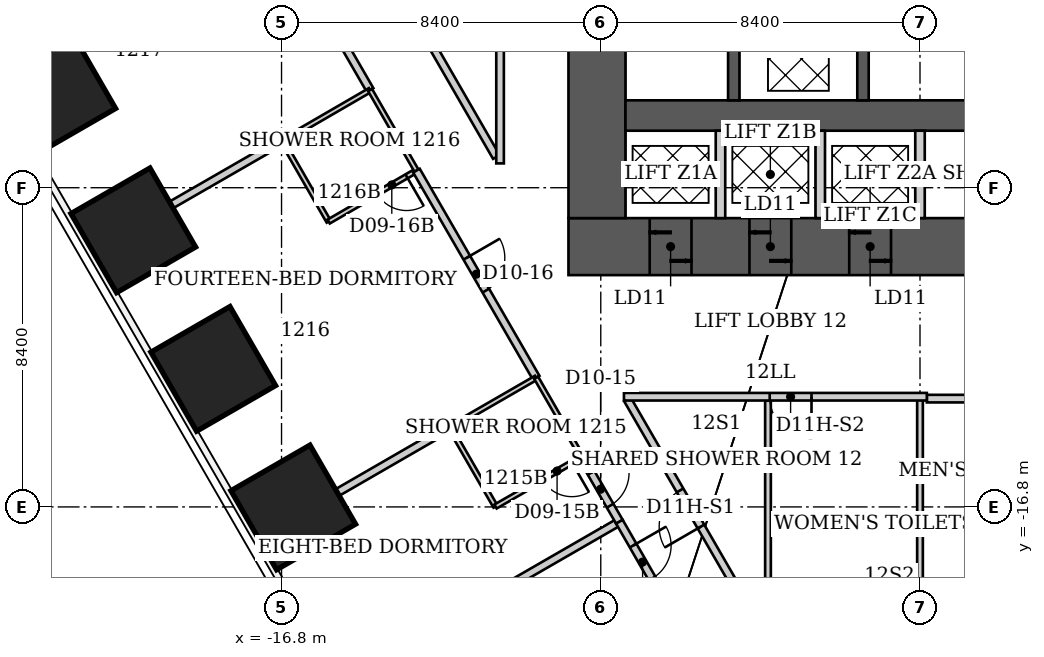
"""IFC4 building model, lengths in metres.
Left out: names, types, materials, properties, quantities, classifications, styles, units other than length and angle.
Written with IfcOpenShell. Run it as: python <this file> out.ifc"""

import sys

from ifc_helpers import new_model, si_unit, direction, frame, frame_2d, origin, origin_2d, place, context, subcontext, project, spatial, rectangle, extrude, clip, halfspace, element, fill, save


model = new_model("IFC4")
c1 = context("Model", 3, precision=1e-05, world=origin(), true_north=direction((0.0, 1.0)))
c2 = subcontext(c1, "Body", "Model", "MODEL_VIEW")
j1 = project(units=[si_unit("LENGTHUNIT", "METRE"), si_unit("PLANEANGLEUNIT", "RADIAN")], contexts=[c1])
p1 = place(None, origin())
s1 = spatial("IfcSite", under=j1, at=p1, CompositionType="ELEMENT")
p2 = place(p1, origin())
s2 = spatial("IfcBuilding", under=s1, at=p2, CompositionType="ELEMENT")
p3 = place(p2, frame((0.0, 0.0, 53.4)))
s3 = spatial("IfcBuildingStorey", under=s2, at=p3, CompositionType="ELEMENT", Elevation=53.4)
p4 = place(p3, frame((-16.491, -16.813, 0.0), z_axis=(0.0, 0.0, 1.0), x_axis=(-0.866025403784, -0.5, 0.0)))
e1 = element("IfcColumn", 1, at=p4, inside=s3, PredefinedType="COLUMN", context=c2, shape_type="SweptSolid", body=[
    clip(extrude(rectangle(XDim=2.4, YDim=2.4, at=origin_2d()), origin(), (0.0, 0.0, 1.0), 3.744), halfspace(frame((0.0, 0.0, 3.64)), False)),
])
for number, where, z_axis, x_axis in (
    (2, (-18.596, -13.167, 0.0), (0.0, 0.0, 1.0), (-0.866, -0.5, 0.0)),
    (3, (-20.701, -9.521, 0.0), (0.0, 0.0, 1.0), (-0.866, -0.5, 0.0)),
):
    element("IfcColumn", number, at=place(p3, frame(where, z_axis=z_axis, x_axis=x_axis)), inside=s3, PredefinedType="COLUMN", context=c2, shape_type="SweptSolid", body=[
        clip(extrude(rectangle(XDim=2.4, YDim=2.4, at=origin_2d()), origin(), (0.0, 0.0, 1.0), 3.752), halfspace(frame((0.0, 0.0, 3.64)), False)),
    ])
p5 = place(p3, frame((-22.806, -5.875, 0.0), z_axis=(0.0, 0.0, 1.0), x_axis=(-0.866025403784, -0.5, 0.0)))
e4 = element("IfcColumn", 4, at=p5, inside=s3, PredefinedType="COLUMN", context=c2, shape_type="SweptSolid", body=[
    clip(extrude(rectangle(XDim=2.4, YDim=2.4, at=origin_2d()), origin(), (0.0, 0.0, 1.0), 3.744), halfspace(frame((0.0, 0.0, 3.64)), False)),
])
p6 = place(p3, frame((-9.25, -9.95, 0.0), z_axis=(0.0, 0.0, 1.0), x_axis=(1.0, 0.0, 0.0)))
e5 = element("IfcWall", 5, at=p6, inside=s3, PredefinedType="SHEAR", context=c2, shape_type="SweptSolid", body=[
    extrude(rectangle(XDim=18.5, YDim=1.5, at=frame_2d((9.25, 0.0))), origin(), (0.0, 0.0, 1.0), 3.8),
])
p7 = place(p6, frame((2.137, 0.0, 0.0)))
e6 = element("IfcOpeningElement", 6, at=p7, cuts=e5, PredefinedType="OPENING", context=c2, shape_type="SweptSolid", body=[
    extrude(rectangle(XDim=1.1, YDim=2.1, at=frame_2d((0.55, 1.05))), frame((0.0, 0.75, 0.0), z_axis=(0.0, -1.0, 0.0), x_axis=(1.0, 0.0, 0.0)), (0.0, 0.0, 1.0), 1.5),
])
p8 = place(p6, frame((4.762, 0.0, 0.0)))
e7 = element("IfcOpeningElement", 7, at=p8, cuts=e5, PredefinedType="OPENING", context=c2, shape_type="SweptSolid", body=[
    extrude(rectangle(XDim=1.1, YDim=2.1, at=frame_2d((0.55, 1.05))), frame((0.0, 0.75, 0.0), z_axis=(0.0, -1.0, 0.0), x_axis=(1.0, 0.0, 0.0)), (0.0, 0.0, 1.0), 1.5),
])
p9 = place(p6, frame((7.387, 0.0, 0.0)))
e8 = element("IfcOpeningElement", 8, at=p9, cuts=e5, PredefinedType="OPENING", context=c2, shape_type="SweptSolid", body=[
    extrude(rectangle(XDim=1.1, YDim=2.1, at=frame_2d((0.55, 1.05))), frame((0.0, 0.75, 0.0), z_axis=(0.0, -1.0, 0.0), x_axis=(1.0, 0.0, 0.0)), (0.0, 0.0, 1.0), 1.5),
])
p10 = place(p3, frame((-8.5, -9.2, 0.0), z_axis=(0.0, 0.0, 1.0), x_axis=(0.0, 1.0, 0.0)))
e9 = element("IfcWall", 9, at=p10, inside=s3, PredefinedType="SHEAR", context=c2, shape_type="SweptSolid", body=[
    extrude(rectangle(XDim=15.3, YDim=1.5, at=frame_2d((7.65, 0.0))), origin(), (0.0, 0.0, 1.0), 3.8),
])
p11 = place(p10, frame((10.7, 0.0, 0.0)))
e10 = element("IfcOpeningElement", 10, at=p11, cuts=e9, PredefinedType="OPENING", context=c2, shape_type="SweptSolid", body=[
    extrude(rectangle(XDim=1.2, YDim=2.2, at=frame_2d((0.6, 1.1))), frame((0.0, 0.75, 0.0), z_axis=(0.0, -1.0, 0.0), x_axis=(1.0, 0.0, 0.0)), (0.0, 0.0, 1.0), 1.5),
])
p12 = place(p3, frame((-7.75, -6.5, 0.0), z_axis=(0.0, 0.0, 1.0), x_axis=(1.0, 0.0, 0.0)))
e11 = element("IfcWall", 11, at=p12, inside=s3, PredefinedType="SHEAR", context=c2, shape_type="SweptSolid", body=[
    extrude(rectangle(XDim=15.5, YDim=0.8, at=frame_2d((7.75, 0.0))), origin(), (0.0, 0.0, 1.0), 3.8),
])
for number, where, z_axis, x_axis in (
    (12, (-4.9, -6.1, 0.0), (0.0, 0.0, 1.0), (0.0, 1.0, 0.0)),
    (13, (-1.5, -6.1, 0.0), (0.0, 0.0, 1.0), (0.0, 1.0, 0.0)),
):
    element("IfcWall", number, at=place(p3, frame(where, z_axis=z_axis, x_axis=x_axis)), inside=s3, PredefinedType="SHEAR", context=c2, shape_type="SweptSolid", body=[
        extrude(rectangle(XDim=7.2, YDim=0.3, at=frame_2d((3.6, 0.0))), origin(), (0.0, 0.0, 1.0), 3.8),
    ])
for number, where, z_axis, x_axis in (
    (14, (-5.25, -9.2, 0.0), (0.0, 0.0, 1.0), (0.0, 1.0, 0.0)),
    (15, (-2.625, -9.2, 0.0), (0.0, 0.0, 1.0), (0.0, 1.0, 0.0)),
    (16, (0.0, -9.2, 0.0), (0.0, 0.0, 1.0), (0.0, 1.0, 0.0)),
):
    element("IfcWall", number, at=place(p3, frame(where, z_axis=z_axis, x_axis=x_axis)), inside=s3, PredefinedType="PARTITIONING", context=c2, shape_type="SweptSolid", body=[
        extrude(rectangle(XDim=2.3, YDim=0.25, at=frame_2d((1.15, 0.0))), origin(), (0.0, 0.0, 1.0), 3.8),
    ])
p13 = place(p3, frame((-21.726, -10.02, 0.0), z_axis=(0.0, 0.0, 1.0), x_axis=(0.866442508333, 0.499276856818, 0.0)))
e17 = element("IfcWall", 17, at=p13, inside=s3, PredefinedType="PARTITIONING", context=c2, shape_type="SweptSolid", body=[
    extrude(rectangle(XDim=5.708, YDim=0.2, at=frame_2d((2.854, 0.0))), origin(), (0.0, 0.0, 1.0), 3.023),
])
p14 = place(p3, frame((-17.621, -0.38, 0.0), z_axis=(0.0, 0.0, 1.0), x_axis=(0.500505674396, -0.865733255627, 0.0)))
e18 = element("IfcWall", 18, at=p14, inside=s3, PredefinedType="PARTITIONING", context=c2, shape_type="SweptSolid", body=[
    extrude(rectangle(XDim=6.295, YDim=0.2, at=frame_2d((3.147, 0.0))), origin(), (0.0, 0.0, 1.0), 3.64),
])
p15 = place(p14, frame((2.647, 0.0, 0.0)))
e19 = element("IfcOpeningElement", 19, at=p15, cuts=e18, PredefinedType="OPENING", context=c2, shape_type="SweptSolid", body=[
    extrude(rectangle(XDim=1.0, YDim=2.13, at=frame_2d((0.5, 1.065))), frame((0.0, 0.1, 0.0), z_axis=(0.0, -1.0, 0.0), x_axis=(1.0, 0.0, 0.0)), (0.0, 0.0, 1.0), 0.2),
])
p16 = place(p3, frame((-17.356, -17.59, 0.0), z_axis=(0.0, 0.0, 1.0), x_axis=(0.865929957466, 0.500165281445, 0.0)))
e20 = element("IfcWall", 20, at=p16, inside=s3, PredefinedType="PARTITIONING", context=c2, shape_type="SweptSolid", body=[
    extrude(rectangle(XDim=5.758, YDim=0.2, at=frame_2d((2.879, 0.0))), origin(), (0.0, 0.0, 1.0), 3.64),
])
p17 = place(p3, frame((-16.78, -7.17, 0.0), z_axis=(0.0, 0.0, 1.0), x_axis=(0.498748634132, -0.866746675766, 0.0)))
e21 = element("IfcWall", 21, at=p17, inside=s3, PredefinedType="PARTITIONING", context=c2, shape_type="SweptSolid", body=[
    extrude(rectangle(XDim=2.446, YDim=0.12, at=frame_2d((1.223, 0.0))), origin(), (0.0, 0.0, 1.0), 3.64),
])
p18 = place(p3, frame((-16.78, -7.17, 0.0), z_axis=(0.0, 0.0, 1.0), x_axis=(0.865029602175, 0.501720826119, 0.0)))
e22 = element("IfcWall", 22, at=p18, inside=s3, PredefinedType="PARTITIONING", context=c2, shape_type="SweptSolid", body=[
    extrude(rectangle(XDim=2.67, YDim=0.12, at=frame_2d((1.335, 0.0))), origin(), (0.0, 0.0, 1.0), 3.023),
])
p19 = place(p3, frame((-15.56, -9.29, 0.0), z_axis=(0.0, 0.0, 1.0), x_axis=(0.86498992408, 0.501789229896, 0.0)))
e23 = element("IfcWall", 23, at=p19, inside=s3, PredefinedType="PARTITIONING", context=c2, shape_type="SweptSolid", body=[
    extrude(rectangle(XDim=2.671, YDim=0.12, at=frame_2d((1.335, 0.0))), origin(), (0.0, 0.0, 1.0), 3.64),
])
p20 = place(p19, frame((1.47, 0.0, 0.0)))
e24 = element("IfcOpeningElement", 24, at=p20, cuts=e23, PredefinedType="OPENING", context=c2, shape_type="SweptSolid", body=[
    extrude(rectangle(XDim=0.9, YDim=2.03, at=frame_2d((0.45, 1.015))), frame((0.0, 0.06, 0.0), z_axis=(0.0, -1.0, 0.0), x_axis=(1.0, 0.0, 0.0)), (0.0, 0.0, 1.0), 0.12),
])
p21 = place(p3, frame((-15.176, -21.38, 0.0), z_axis=(0.0, 0.0, 1.0), x_axis=(0.866276837306, 0.49956425127, 0.0)))
e25 = element("IfcWall", 25, at=p21, inside=s3, PredefinedType="PARTITIONING", context=c2, shape_type="SweptSolid", body=[
    extrude(rectangle(XDim=8.373, YDim=0.2, at=frame_2d((4.186, 0.0))), origin(), (0.0, 0.0, 1.0), 3.64),
])
p22 = place(p3, frame((-14.47, -5.83, 0.0), z_axis=(0.0, 0.0, 1.0), x_axis=(0.498673646582, -0.86678982124, 0.0)))
e26 = element("IfcWall", 26, at=p22, inside=s3, PredefinedType="PARTITIONING", context=c2, shape_type="SweptSolid", body=[
    extrude(rectangle(XDim=2.446, YDim=0.12, at=frame_2d((1.223, 0.0))), origin(), (0.0, 0.0, 1.0), 3.64),
])
p23 = place(p3, frame((-13.25, -7.95, 0.0), z_axis=(0.0, 0.0, 1.0), x_axis=(0.500447534468, -0.865766865412, 0.0)))
e27 = element("IfcWall", 27, at=p23, inside=s3, PredefinedType="PARTITIONING", context=c2, shape_type="SweptSolid", body=[
    extrude(rectangle(XDim=6.295, YDim=0.2, at=frame_2d((3.147, 0.0))), origin(), (0.0, 0.0, 1.0), 3.64),
])
p24 = place(p23, frame((2.647, 0.0, 0.0)))
e28 = element("IfcOpeningElement", 28, at=p24, cuts=e27, PredefinedType="OPENING", context=c2, shape_type="SweptSolid", body=[
    extrude(rectangle(XDim=1.0, YDim=2.13, at=frame_2d((0.5, 1.065))), frame((0.0, 0.1, 0.0), z_axis=(0.0, -1.0, 0.0), x_axis=(1.0, 0.0, 0.0)), (0.0, 0.0, 1.0), 0.2),
])
p25 = place(p3, frame((-12.37, -14.71, 0.0), z_axis=(0.0, 0.0, 1.0), x_axis=(0.499769390944, -0.866158505053, 0.0)))
e29 = element("IfcWall", 29, at=p25, inside=s3, PredefinedType="PARTITIONING", context=c2, shape_type="SweptSolid", body=[
    extrude(rectangle(XDim=2.402, YDim=0.12, at=frame_2d((1.201, 0.0))), origin(), (0.0, 0.0, 1.0), 3.64),
])
p26 = place(p3, frame((-12.37, -14.71, 0.0), z_axis=(0.0, 0.0, 1.0), x_axis=(0.866114241029, 0.499846097802, 0.0)))
e30 = element("IfcWall", 30, at=p26, inside=s3, PredefinedType="PARTITIONING", context=c2, shape_type="SweptSolid", body=[
    extrude(rectangle(XDim=2.621, YDim=0.12, at=frame_2d((1.311, 0.0))), origin(), (0.0, 0.0, 1.0), 3.64),
])
p27 = place(p3, frame((-11.17, -16.79, 0.0), z_axis=(0.0, 0.0, 1.0), x_axis=(0.866114241029, 0.499846097802, 0.0)))
e31 = element("IfcWall", 31, at=p27, inside=s3, PredefinedType="PARTITIONING", context=c2, shape_type="SweptSolid", body=[
    extrude(rectangle(XDim=2.621, YDim=0.12, at=frame_2d((1.311, 0.0))), origin(), (0.0, 0.0, 1.0), 3.64),
])
p28 = place(p27, frame((1.421, 0.0, 0.0)))
e32 = element("IfcOpeningElement", 32, at=p28, cuts=e31, PredefinedType="OPENING", context=c2, shape_type="SweptSolid", body=[
    extrude(rectangle(XDim=0.9, YDim=2.03, at=frame_2d((0.45, 1.015))), frame((0.0, 0.06, 0.0), z_axis=(0.0, -1.0, 0.0), x_axis=(1.0, 0.0, 0.0)), (0.0, 0.0, 1.0), 0.12),
])
p29 = place(p3, frame((-11.147, -7.591, 0.0), z_axis=(0.0, 0.0, 1.0), x_axis=(-0.499915842114, 0.866073986911, 0.0)))
e33 = element("IfcWall", 33, at=p29, inside=s3, PredefinedType="PARTITIONING", context=c2, shape_type="SweptSolid", body=[
    extrude(rectangle(XDim=14.607, YDim=0.2, at=frame_2d((7.304, 0.0))), origin(), (0.0, 0.0, 1.0), 3.64),
])
p30 = place(p3, frame((-11.05, 9.4, 0.0), z_axis=(0.0, 0.0, 1.0), x_axis=(0.0, -1.0, 0.0)))
e34 = element("IfcWall", 34, at=p30, inside=s3, PredefinedType="PARTITIONING", context=c2, shape_type="SweptSolid", body=[
    extrude(rectangle(XDim=17.16, YDim=0.2, at=frame_2d((8.58, 0.0))), origin(), (0.0, 0.0, 1.0), 3.64),
])
p31 = place(p30, frame((8.03, 0.0, 0.0)))
e35 = element("IfcOpeningElement", 35, at=p31, cuts=e34, PredefinedType="OPENING", context=c2, shape_type="SweptSolid", body=[
    extrude(rectangle(XDim=1.1, YDim=2.2, at=frame_2d((0.55, 1.1))), frame((0.0, 0.1, 0.0), z_axis=(0.0, -1.0, 0.0), x_axis=(1.0, 0.0, 0.0)), (0.0, 0.0, 1.0), 0.2),
])
p32 = place(p3, frame((-10.1, -13.4, 0.0), z_axis=(0.0, 0.0, 1.0), x_axis=(0.499769390944, -0.866158505053, 0.0)))
e36 = element("IfcWall", 36, at=p32, inside=s3, PredefinedType="PARTITIONING", context=c2, shape_type="SweptSolid", body=[
    extrude(rectangle(XDim=2.402, YDim=0.12, at=frame_2d((1.201, 0.0))), origin(), (0.0, 0.0, 1.0), 3.64),
])
p33 = place(p3, frame((-8.9, -15.48, 0.0), z_axis=(0.0, 0.0, 1.0), x_axis=(0.501041141208, -0.865423465603, 0.0)))
e37 = element("IfcWall", 37, at=p33, inside=s3, PredefinedType="PARTITIONING", context=c2, shape_type="SweptSolid", body=[
    extrude(rectangle(XDim=1.976, YDim=0.2, at=frame_2d((0.988, 0.0))), origin(), (0.0, 0.0, 1.0), 3.64),
])
p34 = place(p33, frame((0.488, 0.0, 0.0)))
e38 = element("IfcOpeningElement", 38, at=p34, cuts=e37, PredefinedType="OPENING", context=c2, shape_type="SweptSolid", body=[
    extrude(rectangle(XDim=1.0, YDim=2.13, at=frame_2d((0.5, 1.065))), frame((0.0, 0.1, 0.0), z_axis=(0.0, -1.0, 0.0), x_axis=(1.0, 0.0, 0.0)), (0.0, 0.0, 1.0), 0.2),
])
p35 = place(p3, frame((-7.91, -17.19, 0.0), z_axis=(0.0, 0.0, 1.0), x_axis=(0.498748634132, -0.866746675766, 0.0)))
e39 = element("IfcWall", 39, at=p35, inside=s3, PredefinedType="PARTITIONING", context=c2, shape_type="SweptSolid", body=[
    extrude(rectangle(XDim=2.446, YDim=0.2, at=frame_2d((1.223, 0.0))), origin(), (0.0, 0.0, 1.0), 3.64),
])
p36 = place(p35, frame((0.723, 0.0, 0.0)))
e40 = element("IfcOpeningElement", 40, at=p36, cuts=e39, PredefinedType="OPENING", context=c2, shape_type="SweptSolid", body=[
    extrude(rectangle(XDim=1.0, YDim=2.13, at=frame_2d((0.5, 1.065))), frame((0.0, 0.1, 0.0), z_axis=(0.0, -1.0, 0.0), x_axis=(1.0, 0.0, 0.0)), (0.0, 0.0, 1.0), 0.2),
])
p37 = place(p3, frame((-4.38, -19.71, 0.0), z_axis=(0.0, 0.0, 1.0), x_axis=(-0.500523653757, 0.865722860984, 0.0)))
e41 = element("IfcWall", 41, at=p37, inside=s3, PredefinedType="PARTITIONING", context=c2, shape_type="SweptSolid", body=[
    extrude(rectangle(XDim=6.628, YDim=0.2, at=frame_2d((3.314, 0.0))), origin(), (0.0, 0.0, 1.0), 3.64),
])
p38 = place(p37, frame((2.764, 0.0, 0.0)))
e42 = element("IfcOpeningElement", 42, at=p38, cuts=e41, PredefinedType="OPENING", context=c2, shape_type="SweptSolid", body=[
    extrude(rectangle(XDim=1.1, YDim=2.2, at=frame_2d((0.55, 1.1))), frame((0.0, 0.1, 0.0), z_axis=(0.0, -1.0, 0.0), x_axis=(1.0, 0.0, 0.0)), (0.0, 0.0, 1.0), 0.2),
])
p39 = place(p3, frame((-4.0, -14.0, 0.0), z_axis=(0.0, 0.0, 1.0), x_axis=(0.0, -1.0, 0.0)))
e43 = element("IfcWall", 43, at=p39, inside=s3, PredefinedType="PARTITIONING", context=c2, shape_type="SweptSolid", body=[
    extrude(rectangle(XDim=5.71, YDim=0.15, at=frame_2d((2.855, 0.0))), origin(), (0.0, 0.0, 1.0), 3.64),
])
p40 = place(p3, frame((0.0, -13.95, 0.0), z_axis=(0.0, 0.0, 1.0), x_axis=(0.0, -1.0, 0.0)))
e44 = element("IfcWall", 44, at=p40, inside=s3, PredefinedType="PARTITIONING", context=c2, shape_type="SweptSolid", body=[
    extrude(rectangle(XDim=5.76, YDim=0.15, at=frame_2d((2.88, 0.0))), origin(), (0.0, 0.0, 1.0), 2.86),
])
p41 = place(p3, frame((0.18, -13.95, 0.0), z_axis=(0.0, 0.0, 1.0), x_axis=(1.0, 0.0, 0.0)))
e45 = element("IfcWall", 45, at=p41, inside=s3, PredefinedType="PARTITIONING", context=c2, shape_type="SweptSolid", body=[
    extrude(rectangle(XDim=3.82, YDim=0.2, at=frame_2d((1.91, 0.0))), origin(), (0.0, 0.0, 1.0), 3.64),
])
p42 = place(p3, frame((0.18, -13.9, 0.0), z_axis=(0.0, 0.0, 1.0), x_axis=(-1.0, 0.0, 0.0)))
e46 = element("IfcWall", 46, at=p42, inside=s3, PredefinedType="PARTITIONING", context=c2, shape_type="SweptSolid", body=[
    extrude(rectangle(XDim=7.97, YDim=0.2, at=frame_2d((3.985, 0.0))), origin(), (0.0, 0.0, 1.0), 3.64),
])
p43 = place(p42, frame((3.035, 0.0, 0.0)))
e47 = element("IfcOpeningElement", 47, at=p43, cuts=e46, PredefinedType="OPENING", context=c2, shape_type="SweptSolid", body=[
    extrude(rectangle(XDim=1.1, YDim=2.2, at=frame_2d((0.55, 1.1))), frame((0.0, 0.1, 0.0), z_axis=(0.0, -1.0, 0.0), x_axis=(1.0, 0.0, 0.0)), (0.0, 0.0, 1.0), 0.2),
])
p44 = place(p36, origin())
e48 = element("IfcDoor", 48, at=p44, inside=s3, OperationType="SINGLE_SWING_LEFT", PredefinedType="DOOR", context=c2, shape_type="SweptSolid", body=[
    extrude(rectangle(XDim=1.0, YDim=2.13, at=frame_2d((0.5, 1.065))), frame((0.0, 0.025, 0.0), z_axis=(0.0, -1.0, 0.0), x_axis=(1.0, 0.0, 0.0)), (0.0, 0.0, 1.0), 0.05),
])
fill(e40, e48)
p45 = place(p34, origin())
e49 = element("IfcDoor", 49, at=p45, inside=s3, OperationType="SINGLE_SWING_LEFT", PredefinedType="DOOR", context=c2, shape_type="SweptSolid", body=[
    extrude(rectangle(XDim=1.0, YDim=2.13, at=frame_2d((0.5, 1.065))), frame((0.0, 0.025, 0.0), z_axis=(0.0, -1.0, 0.0), x_axis=(1.0, 0.0, 0.0)), (0.0, 0.0, 1.0), 0.05),
])
fill(e38, e49)
p46 = place(p28, origin())
e50 = element("IfcDoor", 50, at=p46, inside=s3, OperationType="SINGLE_SWING_RIGHT", PredefinedType="DOOR", context=c2, shape_type="SweptSolid", body=[
    extrude(rectangle(XDim=0.9, YDim=2.03, at=frame_2d((0.45, 1.015))), frame((0.0, 0.025, 0.0), z_axis=(0.0, -1.0, 0.0), x_axis=(1.0, 0.0, 0.0)), (0.0, 0.0, 1.0), 0.05),
])
fill(e32, e50)
p47 = place(p24, origin())
e51 = element("IfcDoor", 51, at=p47, inside=s3, OperationType="SINGLE_SWING_LEFT", PredefinedType="DOOR", context=c2, shape_type="SweptSolid", body=[
    extrude(rectangle(XDim=1.0, YDim=2.13, at=frame_2d((0.5, 1.065))), frame((0.0, 0.025, 0.0), z_axis=(0.0, -1.0, 0.0), x_axis=(1.0, 0.0, 0.0)), (0.0, 0.0, 1.0), 0.05),
])
fill(e28, e51)
p48 = place(p20, origin())
e52 = element("IfcDoor", 52, at=p48, inside=s3, OperationType="SINGLE_SWING_RIGHT", PredefinedType="DOOR", context=c2, shape_type="SweptSolid", body=[
    extrude(rectangle(XDim=0.9, YDim=2.03, at=frame_2d((0.45, 1.015))), frame((0.0, 0.025, 0.0), z_axis=(0.0, -1.0, 0.0), x_axis=(1.0, 0.0, 0.0)), (0.0, 0.0, 1.0), 0.05),
])
fill(e24, e52)
p49 = place(p38, origin())
e53 = element("IfcDoor", 53, at=p49, inside=s3, OperationType="SINGLE_SWING_LEFT", PredefinedType="DOOR", context=c2, shape_type="SweptSolid", body=[
    extrude(rectangle(XDim=1.1, YDim=2.2, at=frame_2d((0.55, 1.1))), frame((0.0, 0.025, 0.0), z_axis=(0.0, -1.0, 0.0), x_axis=(1.0, 0.0, 0.0)), (0.0, 0.0, 1.0), 0.05),
])
fill(e42, e53)
p50 = place(p43, origin())
e54 = element("IfcDoor", 54, at=p50, inside=s3, OperationType="SINGLE_SWING_LEFT", PredefinedType="DOOR", context=c2, shape_type="SweptSolid", body=[
    extrude(rectangle(XDim=1.1, YDim=2.2, at=frame_2d((0.55, 1.1))), frame((0.0, 0.025, 0.0), z_axis=(0.0, -1.0, 0.0), x_axis=(1.0, 0.0, 0.0)), (0.0, 0.0, 1.0), 0.05),
])
fill(e47, e54)
p51 = place(p7, origin())
e55 = element("IfcDoor", 55, at=p51, inside=s3, OperationType="DOUBLE_DOOR_SLIDING", PredefinedType="DOOR", context=c2, shape_type="SweptSolid", body=[
    extrude(rectangle(XDim=1.1, YDim=2.1, at=frame_2d((0.55, 1.05))), frame((0.0, 0.025, 0.0), z_axis=(0.0, -1.0, 0.0), x_axis=(1.0, 0.0, 0.0)), (0.0, 0.0, 1.0), 0.05),
])
fill(e6, e55)
p52 = place(p8, origin())
e56 = element("IfcDoor", 56, at=p52, inside=s3, OperationType="DOUBLE_DOOR_SLIDING", PredefinedType="DOOR", context=c2, shape_type="SweptSolid", body=[
    extrude(rectangle(XDim=1.1, YDim=2.1, at=frame_2d((0.55, 1.05))), frame((0.0, 0.025, 0.0), z_axis=(0.0, -1.0, 0.0), x_axis=(1.0, 0.0, 0.0)), (0.0, 0.0, 1.0), 0.05),
])
fill(e7, e56)
p53 = place(p9, origin())
e57 = element("IfcDoor", 57, at=p53, inside=s3, OperationType="DOUBLE_DOOR_SLIDING", PredefinedType="DOOR", context=c2, shape_type="SweptSolid", body=[
    extrude(rectangle(XDim=1.1, YDim=2.1, at=frame_2d((0.55, 1.05))), frame((0.0, 0.025, 0.0), z_axis=(0.0, -1.0, 0.0), x_axis=(1.0, 0.0, 0.0)), (0.0, 0.0, 1.0), 0.05),
])
fill(e8, e57)
save(model, sys.argv[1])
